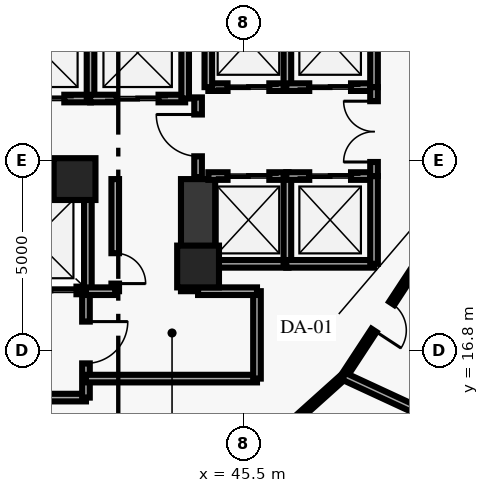
"""IFC4 building model, lengths in metres.
Left out: names, types, materials, properties, quantities, classifications, styles, units other than length and angle.
Written with IfcOpenShell. Run it as: python <this file> out.ifc"""

import sys

from ifc_helpers import new_model, si_unit, direction, frame, frame_2d, origin, origin_2d, place, context, subcontext, project, spatial, rectangle, extrude, element, fill, save


model = new_model("IFC4")
c1 = context("Model", 3, precision=1e-05, world=origin(), true_north=direction((0.0, 1.0)))
c2 = subcontext(c1, "Body", "Model", "MODEL_VIEW")
j1 = project(units=[si_unit("LENGTHUNIT", "METRE"), si_unit("PLANEANGLEUNIT", "RADIAN")], contexts=[c1])
p1 = place(None, origin())
s1 = spatial("IfcSite", under=j1, at=p1, CompositionType="ELEMENT")
p2 = place(p1, origin())
s2 = spatial("IfcBuilding", under=s1, at=p2, CompositionType="ELEMENT")
p3 = place(p2, origin())
s3 = spatial("IfcBuildingStorey", under=s2, at=p3, CompositionType="ELEMENT", Elevation=0.0)
for number, where, z_axis, x_axis in (
    (1, (41.05, 21.3, 0.0), (0.0, 0.0, 1.0), (1.0, 0.0, 0.0)),
    (2, (44.3, 19.0, 0.0), (0.0, 0.0, 1.0), (1.0, 0.0, 0.0)),
):
    element("IfcColumn", number, at=place(p3, frame(where, z_axis=z_axis, x_axis=x_axis)), inside=s3, PredefinedType="PILASTER", context=c2, shape_type="SweptSolid", body=[
        extrude(rectangle(XDim=1.1, YDim=1.1, at=origin_2d()), origin(), (0.0, 0.0, 1.0), 5.7),
    ])
p4 = place(p3, frame((44.3, 18.35, 0.0), z_axis=(0.0, 0.0, 1.0), x_axis=(0.0, 1.0, 0.0)))
e3 = element("IfcWall", 3, at=p4, inside=s3, PredefinedType="SHEAR", context=c2, shape_type="SweptSolid", body=[
    extrude(rectangle(XDim=2.95, YDim=0.9, at=frame_2d((1.475, 0.0))), origin(), (0.0, 0.0, 1.0), 5.7),
])
p5 = place(p3, frame((33.7, 21.3, 0.0), z_axis=(0.0, 0.0, 1.0), x_axis=(1.0, 0.0, 0.0)))
e4 = element("IfcWall", 4, at=p5, inside=s3, PredefinedType="SHEAR", context=c2, shape_type="SweptSolid", body=[
    extrude(rectangle(XDim=7.55, YDim=0.9, at=frame_2d((3.775, 0.0))), origin(), (0.0, 0.0, 1.0), 5.7),
])
p6 = place(p3, frame((44.57, 23.72, 0.0), z_axis=(0.0, 0.0, 1.0), x_axis=(1.0, 0.0, 0.0)))
e5 = element("IfcWall", 5, at=p6, inside=s3, PredefinedType="SOLIDWALL", context=c2, shape_type="SweptSolid", body=[
    extrude(rectangle(XDim=2.11, YDim=0.2, at=frame_2d((1.055, 0.0))), origin(), (0.0, 0.0, 1.0), 5.7),
])
p7 = place(p6, frame((0.505, 0.0, 0.0)))
e6 = element("IfcOpeningElement", 6, at=p7, cuts=e5, PredefinedType="OPENING", context=c2, shape_type="SweptSolid", body=[
    extrude(rectangle(XDim=1.1, YDim=2.15, at=frame_2d((0.55, 1.075))), frame((0.0, 0.11, 0.0), z_axis=(0.0, -1.0, 0.0), x_axis=(1.0, 0.0, 0.0)), (0.0, 0.0, 1.0), 0.22),
])
for number, where, z_axis, x_axis in (
    (7, (44.57, 23.72, 0.0), (0.0, 0.0, 1.0), (0.0, 1.0, 0.0)),
    (8, (46.65, 23.72, 0.0), (0.0, 0.0, 1.0), (0.0, 1.0, 0.0)),
):
    element("IfcWall", number, at=place(p3, frame(where, z_axis=z_axis, x_axis=x_axis)), inside=s3, PredefinedType="SOLIDWALL", context=c2, shape_type="SweptSolid", body=[
        extrude(rectangle(XDim=2.41, YDim=0.2, at=frame_2d((1.205, 0.0))), origin(), (0.0, 0.0, 1.0), 5.7),
    ])
p8 = place(p3, frame((46.62, 23.72, 0.0), z_axis=(0.0, 0.0, 1.0), x_axis=(1.0, 0.0, 0.0)))
e9 = element("IfcWall", 9, at=p8, inside=s3, PredefinedType="SOLIDWALL", context=c2, shape_type="SweptSolid", body=[
    extrude(rectangle(XDim=2.31, YDim=0.2, at=frame_2d((1.155, 0.0))), origin(), (0.0, 0.0, 1.0), 5.7),
])
p9 = place(p8, frame((0.605, 0.0, 0.0)))
e10 = element("IfcOpeningElement", 10, at=p9, cuts=e9, PredefinedType="OPENING", context=c2, shape_type="SweptSolid", body=[
    extrude(rectangle(XDim=1.1, YDim=2.15, at=frame_2d((0.55, 1.075))), frame((0.0, 0.11, 0.0), z_axis=(0.0, -1.0, 0.0), x_axis=(1.0, 0.0, 0.0)), (0.0, 0.0, 1.0), 0.22),
])
p10 = place(p3, frame((48.93, 23.72, 0.0), z_axis=(0.0, 0.0, 1.0), x_axis=(0.0, 1.0, 0.0)))
e11 = element("IfcWall", 11, at=p10, inside=s3, PredefinedType="SOLIDWALL", context=c2, shape_type="SweptSolid", body=[
    extrude(rectangle(XDim=2.41, YDim=0.2, at=frame_2d((1.205, 0.0))), origin(), (0.0, 0.0, 1.0), 5.7),
])
p11 = place(p3, frame((44.57, 19.07, 0.0), z_axis=(0.0, 0.0, 1.0), x_axis=(1.0, 0.0, 0.0)))
e12 = element("IfcWall", 12, at=p11, inside=s3, PredefinedType="SOLIDWALL", context=c2, shape_type="SweptSolid", body=[
    extrude(rectangle(XDim=2.11, YDim=0.2, at=frame_2d((1.055, 0.0))), origin(), (0.0, 0.0, 1.0), 5.7),
])
p12 = place(p3, frame((44.57, 21.38, 0.0), z_axis=(0.0, 0.0, 1.0), x_axis=(1.0, 0.0, 0.0)))
e13 = element("IfcWall", 13, at=p12, inside=s3, PredefinedType="SOLIDWALL", context=c2, shape_type="SweptSolid", body=[
    extrude(rectangle(XDim=2.11, YDim=0.2, at=frame_2d((1.055, 0.0))), origin(), (0.0, 0.0, 1.0), 5.7),
])
p13 = place(p12, frame((0.505, 0.0, 0.0)))
e14 = element("IfcOpeningElement", 14, at=p13, cuts=e13, PredefinedType="OPENING", context=c2, shape_type="SweptSolid", body=[
    extrude(rectangle(XDim=1.1, YDim=2.15, at=frame_2d((0.55, 1.075))), frame((0.0, 0.11, 0.0), z_axis=(0.0, -1.0, 0.0), x_axis=(1.0, 0.0, 0.0)), (0.0, 0.0, 1.0), 0.22),
])
for number, where, z_axis, x_axis in (
    (15, (46.65, 19.07, 0.0), (0.0, 0.0, 1.0), (0.0, 1.0, 0.0)),
    (16, (46.62, 19.07, 0.0), (0.0, 0.0, 1.0), (1.0, 0.0, 0.0)),
):
    element("IfcWall", number, at=place(p3, frame(where, z_axis=z_axis, x_axis=x_axis)), inside=s3, PredefinedType="SOLIDWALL", context=c2, shape_type="SweptSolid", body=[
        extrude(rectangle(XDim=2.31, YDim=0.2, at=frame_2d((1.155, 0.0))), origin(), (0.0, 0.0, 1.0), 5.7),
    ])
p14 = place(p3, frame((46.62, 21.38, 0.0), z_axis=(0.0, 0.0, 1.0), x_axis=(1.0, 0.0, 0.0)))
e17 = element("IfcWall", 17, at=p14, inside=s3, PredefinedType="SOLIDWALL", context=c2, shape_type="SweptSolid", body=[
    extrude(rectangle(XDim=2.31, YDim=0.2, at=frame_2d((1.155, 0.0))), origin(), (0.0, 0.0, 1.0), 5.7),
])
p15 = place(p14, frame((0.605, 0.0, 0.0)))
e18 = element("IfcOpeningElement", 18, at=p15, cuts=e17, PredefinedType="OPENING", context=c2, shape_type="SweptSolid", body=[
    extrude(rectangle(XDim=1.1, YDim=2.15, at=frame_2d((0.55, 1.075))), frame((0.0, 0.11, 0.0), z_axis=(0.0, -1.0, 0.0), x_axis=(1.0, 0.0, 0.0)), (0.0, 0.0, 1.0), 0.22),
])
p16 = place(p3, frame((48.93, 19.07, 0.0), z_axis=(0.0, 0.0, 1.0), x_axis=(0.0, 1.0, 0.0)))
e19 = element("IfcWall", 19, at=p16, inside=s3, PredefinedType="SOLIDWALL", context=c2, shape_type="SweptSolid", body=[
    extrude(rectangle(XDim=2.31, YDim=0.2, at=frame_2d((1.155, 0.0))), origin(), (0.0, 0.0, 1.0), 5.7),
])
p17 = place(p3, frame((38.98, 23.42, 0.0), z_axis=(0.0, 0.0, 1.0), x_axis=(1.0, 0.0, 0.0)))
e20 = element("IfcWall", 20, at=p17, inside=s3, PredefinedType="SOLIDWALL", context=c2, shape_type="SweptSolid", body=[
    extrude(rectangle(XDim=2.5, YDim=0.2, at=frame_2d((1.25, 0.0))), origin(), (0.0, 0.0, 1.0), 5.7),
])
p18 = place(p17, frame((0.7, 0.0, 0.0)))
e21 = element("IfcOpeningElement", 21, at=p18, cuts=e20, PredefinedType="OPENING", context=c2, shape_type="SweptSolid", body=[
    extrude(rectangle(XDim=1.1, YDim=2.15, at=frame_2d((0.55, 1.075))), frame((0.0, 0.11, 0.0), z_axis=(0.0, -1.0, 0.0), x_axis=(1.0, 0.0, 0.0)), (0.0, 0.0, 1.0), 0.22),
])
p19 = place(p3, frame((41.47, 23.42, 0.0), z_axis=(0.0, 0.0, 1.0), x_axis=(0.0, 1.0, 0.0)))
e22 = element("IfcWall", 22, at=p19, inside=s3, PredefinedType="SOLIDWALL", context=c2, shape_type="SweptSolid", body=[
    extrude(rectangle(XDim=2.41, YDim=0.2, at=frame_2d((1.205, 0.0))), origin(), (0.0, 0.0, 1.0), 5.7),
])
p20 = place(p3, frame((41.46, 23.42, 0.0), z_axis=(0.0, 0.0, 1.0), x_axis=(1.0, 0.0, 0.0)))
e23 = element("IfcWall", 23, at=p20, inside=s3, PredefinedType="SOLIDWALL", context=c2, shape_type="SweptSolid", body=[
    extrude(rectangle(XDim=2.5, YDim=0.2, at=frame_2d((1.25, 0.0))), origin(), (0.0, 0.0, 1.0), 5.7),
])
p21 = place(p20, frame((0.7, 0.0, 0.0)))
e24 = element("IfcOpeningElement", 24, at=p21, cuts=e23, PredefinedType="OPENING", context=c2, shape_type="SweptSolid", body=[
    extrude(rectangle(XDim=1.1, YDim=2.15, at=frame_2d((0.55, 1.075))), frame((0.0, 0.11, 0.0), z_axis=(0.0, -1.0, 0.0), x_axis=(1.0, 0.0, 0.0)), (0.0, 0.0, 1.0), 0.22),
])
p22 = place(p3, frame((43.96, 23.42, 0.0), z_axis=(0.0, 0.0, 1.0), x_axis=(0.0, 1.0, 0.0)))
e25 = element("IfcWall", 25, at=p22, inside=s3, PredefinedType="SOLIDWALL", context=c2, shape_type="SweptSolid", body=[
    extrude(rectangle(XDim=2.41, YDim=0.2, at=frame_2d((1.205, 0.0))), origin(), (0.0, 0.0, 1.0), 5.7),
])
p23 = place(p3, frame((38.57, 18.37, 0.0), z_axis=(0.0, 0.0, 1.0), x_axis=(1.0, 0.0, 0.0)))
e26 = element("IfcWall", 26, at=p23, inside=s3, PredefinedType="SOLIDWALL", context=c2, shape_type="SweptSolid", body=[
    extrude(rectangle(XDim=2.83, YDim=0.2, at=frame_2d((1.415, 0.0))), origin(), (0.0, 0.0, 1.0), 5.7),
])
p24 = place(p23, frame((1.18, 0.0, 0.0)))
e27 = element("IfcOpeningElement", 27, at=p24, cuts=e26, PredefinedType="OPENING", context=c2, shape_type="SweptSolid", body=[
    extrude(rectangle(XDim=1.35, YDim=2.18, at=frame_2d((0.675, 1.09))), frame((0.0, 0.11, 0.0), z_axis=(0.0, -1.0, 0.0), x_axis=(1.0, 0.0, 0.0)), (0.0, 0.0, 1.0), 0.22),
])
p25 = place(p3, frame((41.4, 18.37, 0.0), z_axis=(0.0, 0.0, 1.0), x_axis=(0.0, 1.0, 0.0)))
e28 = element("IfcWall", 28, at=p25, inside=s3, PredefinedType="SOLIDWALL", context=c2, shape_type="SweptSolid", body=[
    extrude(rectangle(XDim=2.71, YDim=0.2, at=frame_2d((1.355, 0.0))), origin(), (0.0, 0.0, 1.0), 5.7),
])
p26 = place(p3, frame((48.93, 23.72, 0.0), z_axis=(0.0, 0.0, 1.0), x_axis=(0.0, -1.0, 0.0)))
e29 = element("IfcWall", 29, at=p26, inside=s3, PredefinedType="SOLIDWALL", context=c2, shape_type="SweptSolid", body=[
    extrude(rectangle(XDim=2.34, YDim=0.2, at=frame_2d((1.17, 0.0))), origin(), (0.0, 0.0, 1.0), 5.7),
])
p27 = place(p26, frame((0.37, 0.0, 0.0)))
e30 = element("IfcOpeningElement", 30, at=p27, cuts=e29, PredefinedType="OPENING", context=c2, shape_type="SweptSolid", body=[
    extrude(rectangle(XDim=1.6, YDim=2.2, at=frame_2d((0.8, 1.1))), frame((0.0, 0.11, 0.0), z_axis=(0.0, -1.0, 0.0), x_axis=(1.0, 0.0, 0.0)), (0.0, 0.0, 1.0), 0.22),
])
p28 = place(p3, frame((44.3, 23.45, 0.0), z_axis=(0.0, 0.0, 1.0), x_axis=(0.0, -1.0, 0.0)))
e31 = element("IfcWall", 31, at=p28, inside=s3, PredefinedType="SOLIDWALL", context=c2, shape_type="SweptSolid", body=[
    extrude(rectangle(XDim=2.1, YDim=0.2, at=frame_2d((1.05, 0.0))), origin(), (0.0, 0.0, 1.0), 4.92),
])
p29 = place(p28, frame((0.45, 0.0, 0.0)))
e32 = element("IfcOpeningElement", 32, at=p29, cuts=e31, PredefinedType="OPENING", context=c2, shape_type="SweptSolid", body=[
    extrude(rectangle(XDim=1.1, YDim=2.15, at=frame_2d((0.55, 1.075))), frame((0.0, 0.11, 0.0), z_axis=(0.0, -1.0, 0.0), x_axis=(1.0, 0.0, 0.0)), (0.0, 0.0, 1.0), 0.22),
])
p30 = place(p3, frame((33.8, 15.55, 0.0), z_axis=(0.0, 0.0, 1.0), x_axis=(1.0, 0.0, 0.0)))
e33 = element("IfcWall", 33, at=p30, inside=s3, PredefinedType="SOLIDWALL", context=c2, shape_type="SweptSolid", body=[
    extrude(rectangle(XDim=7.55, YDim=0.2, at=frame_2d((3.775, 0.0))), origin(), (0.0, 0.0, 1.0), 5.7),
])
p31 = place(p3, frame((41.35, 18.35, 0.0), z_axis=(0.0, 0.0, 1.0), x_axis=(0.0, -1.0, 0.0)))
e34 = element("IfcWall", 34, at=p31, inside=s3, PredefinedType="SOLIDWALL", context=c2, shape_type="SweptSolid", body=[
    extrude(rectangle(XDim=2.8, YDim=0.2, at=frame_2d((1.4, 0.0))), origin(), (0.0, 0.0, 1.0), 5.7),
])
p32 = place(p31, frame((0.8, 0.0, 0.0)))
e35 = element("IfcOpeningElement", 35, at=p32, cuts=e34, PredefinedType="OPENING", context=c2, shape_type="SweptSolid", body=[
    extrude(rectangle(XDim=1.1, YDim=2.15, at=frame_2d((0.55, 1.075))), frame((0.0, 0.11, 0.0), z_axis=(0.0, -1.0, 0.0), x_axis=(1.0, 0.0, 0.0)), (0.0, 0.0, 1.0), 0.22),
])
p33 = place(p3, frame((41.35, 16.05, 0.0), z_axis=(0.0, 0.0, 1.0), x_axis=(1.0, 0.0, 0.0)))
e36 = element("IfcWall", 36, at=p33, inside=s3, PredefinedType="SOLIDWALL", context=c2, shape_type="SweptSolid", body=[
    extrude(rectangle(XDim=4.5, YDim=0.2, at=frame_2d((2.25, 0.0))), origin(), (0.0, 0.0, 1.0), 5.7),
])
p34 = place(p3, frame((45.85, 16.05, 0.0), z_axis=(0.0, 0.0, 1.0), x_axis=(0.0, 1.0, 0.0)))
e37 = element("IfcWall", 37, at=p34, inside=s3, PredefinedType="SOLIDWALL", context=c2, shape_type="SweptSolid", body=[
    extrude(rectangle(XDim=2.3, YDim=0.2, at=frame_2d((1.15, 0.0))), origin(), (0.0, 0.0, 1.0), 5.7),
])
p35 = place(p3, frame((44.3, 18.35, 0.0), z_axis=(0.0, 0.0, 1.0), x_axis=(1.0, 0.0, 0.0)))
e38 = element("IfcWall", 38, at=p35, inside=s3, PredefinedType="SOLIDWALL", context=c2, shape_type="SweptSolid", body=[
    extrude(rectangle(XDim=1.55, YDim=0.2, at=frame_2d((0.775, 0.0))), origin(), (0.0, 0.0, 1.0), 5.7),
])
p36 = place(p3, frame((42.12, 18.35, 0.0), z_axis=(0.0, 0.0, 1.0), x_axis=(0.0, 1.0, 0.0)))
e39 = element("IfcWall", 39, at=p36, inside=s3, PredefinedType="SOLIDWALL", context=c2, shape_type="SweptSolid", body=[
    extrude(rectangle(XDim=2.95, YDim=0.2, at=frame_2d((1.475, 0.0))), origin(), (0.0, 0.0, 1.0), 5.7),
])
p37 = place(p36, frame((0.2, 0.0, 0.0)))
e40 = element("IfcOpeningElement", 40, at=p37, cuts=e39, PredefinedType="OPENING", context=c2, shape_type="SweptSolid", body=[
    extrude(rectangle(XDim=0.8, YDim=2.05, at=frame_2d((0.4, 1.025))), frame((0.0, 0.11, 0.0), z_axis=(0.0, -1.0, 0.0), x_axis=(1.0, 0.0, 0.0)), (0.0, 0.0, 1.0), 0.22),
])
p38 = place(p3, frame((41.35, 18.35, 0.0), z_axis=(0.0, 0.0, 1.0), x_axis=(1.0, 0.0, 0.0)))
e41 = element("IfcWall", 41, at=p38, inside=s3, PredefinedType="SOLIDWALL", context=c2, shape_type="SweptSolid", body=[
    extrude(rectangle(XDim=0.77, YDim=0.2, at=frame_2d((0.385, 0.0))), origin(), (0.0, 0.0, 1.0), 5.7),
])
p39 = place(p3, frame((45.46, 13.706, 0.0), z_axis=(0.0, 0.0, 1.0), x_axis=(0.744066617248, 0.668105432621, 0.0)))
e42 = element("IfcWall", 42, at=p39, inside=s3, PredefinedType="PARTITIONING", context=c2, shape_type="SweptSolid", body=[
    extrude(rectangle(XDim=3.596, YDim=0.16, at=frame_2d((1.798, 0.0))), origin(), (0.0, 0.0, 1.0), 5.7),
])
p40 = place(p3, frame((50.189, 19.24, 0.0), z_axis=(0.0, 0.0, 1.0), x_axis=(-0.548318837904, -0.836269365694, 0.0)))
e43 = element("IfcWall", 43, at=p40, inside=s3, PredefinedType="PARTITIONING", context=c2, shape_type="SweptSolid", body=[
    extrude(rectangle(XDim=3.744, YDim=0.16, at=frame_2d((1.872, 0.0))), origin(), (0.0, 0.0, 1.0), 5.7),
])
p41 = place(p40, frame((1.447, 0.0, 0.0)))
e44 = element("IfcOpeningElement", 44, at=p41, cuts=e43, PredefinedType="OPENING", context=c2, shape_type="SweptSolid", body=[
    extrude(rectangle(XDim=0.85, YDim=2.1, at=frame_2d((0.425, 1.05))), frame((0.0, 0.09, 0.0), z_axis=(0.0, -1.0, 0.0), x_axis=(1.0, 0.0, 0.0)), (0.0, 0.0, 1.0), 0.18),
])
p42 = place(p3, frame((48.136, 16.109, 0.0), z_axis=(0.0, 0.0, 1.0), x_axis=(0.907508335547, -0.420034071133, 0.0)))
e45 = element("IfcWall", 45, at=p42, inside=s3, PredefinedType="PARTITIONING", context=c2, shape_type="SweptSolid", body=[
    extrude(rectangle(XDim=2.538, YDim=0.2, at=frame_2d((1.269, 0.0))), origin(), (0.0, 0.0, 1.0), 5.7),
])
p43 = place(p7, origin())
e46 = element("IfcDoor", 46, at=p43, inside=s3, OperationType="DOUBLE_DOOR_SLIDING", PredefinedType="DOOR", context=c2, shape_type="SweptSolid", body=[
    extrude(rectangle(XDim=1.1, YDim=2.15, at=frame_2d((0.55, 1.075))), frame((0.0, 0.025, 0.0), z_axis=(0.0, -1.0, 0.0), x_axis=(1.0, 0.0, 0.0)), (0.0, 0.0, 1.0), 0.05),
])
fill(e6, e46)
p44 = place(p9, origin())
e47 = element("IfcDoor", 47, at=p44, inside=s3, OperationType="DOUBLE_DOOR_SLIDING", PredefinedType="DOOR", context=c2, shape_type="SweptSolid", body=[
    extrude(rectangle(XDim=1.1, YDim=2.15, at=frame_2d((0.55, 1.075))), frame((0.0, 0.025, 0.0), z_axis=(0.0, -1.0, 0.0), x_axis=(1.0, 0.0, 0.0)), (0.0, 0.0, 1.0), 0.05),
])
fill(e10, e47)
p45 = place(p13, origin())
e48 = element("IfcDoor", 48, at=p45, inside=s3, OperationType="DOUBLE_DOOR_SLIDING", PredefinedType="DOOR", context=c2, shape_type="SweptSolid", body=[
    extrude(rectangle(XDim=1.1, YDim=2.15, at=frame_2d((0.55, 1.075))), frame((0.0, 0.025, 0.0), z_axis=(0.0, -1.0, 0.0), x_axis=(1.0, 0.0, 0.0)), (0.0, 0.0, 1.0), 0.05),
])
fill(e14, e48)
p46 = place(p15, origin())
e49 = element("IfcDoor", 49, at=p46, inside=s3, OperationType="DOUBLE_DOOR_SLIDING", PredefinedType="DOOR", context=c2, shape_type="SweptSolid", body=[
    extrude(rectangle(XDim=1.1, YDim=2.15, at=frame_2d((0.55, 1.075))), frame((0.0, 0.025, 0.0), z_axis=(0.0, -1.0, 0.0), x_axis=(1.0, 0.0, 0.0)), (0.0, 0.0, 1.0), 0.05),
])
fill(e18, e49)
p47 = place(p18, origin())
e50 = element("IfcDoor", 50, at=p47, inside=s3, OperationType="DOUBLE_DOOR_SLIDING", PredefinedType="DOOR", context=c2, shape_type="SweptSolid", body=[
    extrude(rectangle(XDim=1.1, YDim=2.15, at=frame_2d((0.55, 1.075))), frame((0.0, 0.025, 0.0), z_axis=(0.0, -1.0, 0.0), x_axis=(1.0, 0.0, 0.0)), (0.0, 0.0, 1.0), 0.05),
])
fill(e21, e50)
p48 = place(p21, origin())
e51 = element("IfcDoor", 51, at=p48, inside=s3, OperationType="DOUBLE_DOOR_SLIDING", PredefinedType="DOOR", context=c2, shape_type="SweptSolid", body=[
    extrude(rectangle(XDim=1.1, YDim=2.15, at=frame_2d((0.55, 1.075))), frame((0.0, 0.025, 0.0), z_axis=(0.0, -1.0, 0.0), x_axis=(1.0, 0.0, 0.0)), (0.0, 0.0, 1.0), 0.05),
])
fill(e24, e51)
p49 = place(p24, origin())
e52 = element("IfcDoor", 52, at=p49, inside=s3, OperationType="DOUBLE_DOOR_SLIDING", PredefinedType="DOOR", context=c2, shape_type="SweptSolid", body=[
    extrude(rectangle(XDim=1.35, YDim=2.18, at=frame_2d((0.675, 1.09))), frame((0.0, 0.025, 0.0), z_axis=(0.0, -1.0, 0.0), x_axis=(1.0, 0.0, 0.0)), (0.0, 0.0, 1.0), 0.05),
])
fill(e27, e52)
p50 = place(p27, origin())
e53 = element("IfcDoor", 53, at=p50, inside=s3, OperationType="DOUBLE_DOOR_SINGLE_SWING", PredefinedType="DOOR", context=c2, shape_type="SweptSolid", body=[
    extrude(rectangle(XDim=1.6, YDim=2.2, at=frame_2d((0.8, 1.1))), frame((0.0, 0.025, 0.0), z_axis=(0.0, -1.0, 0.0), x_axis=(1.0, 0.0, 0.0)), (0.0, 0.0, 1.0), 0.05),
])
fill(e30, e53)
p51 = place(p29, origin())
e54 = element("IfcDoor", 54, at=p51, inside=s3, OperationType="SINGLE_SWING_LEFT", PredefinedType="DOOR", context=c2, shape_type="SweptSolid", body=[
    extrude(rectangle(XDim=1.1, YDim=2.15, at=frame_2d((0.55, 1.075))), frame((0.0, 0.025, 0.0), z_axis=(0.0, -1.0, 0.0), x_axis=(1.0, 0.0, 0.0)), (0.0, 0.0, 1.0), 0.05),
])
fill(e32, e54)
p52 = place(p32, origin())
e55 = element("IfcDoor", 55, at=p52, inside=s3, OperationType="SINGLE_SWING_LEFT", PredefinedType="DOOR", context=c2, shape_type="SweptSolid", body=[
    extrude(rectangle(XDim=1.1, YDim=2.15, at=frame_2d((0.55, 1.075))), frame((0.0, 0.025, 0.0), z_axis=(0.0, -1.0, 0.0), x_axis=(1.0, 0.0, 0.0)), (0.0, 0.0, 1.0), 0.05),
])
fill(e35, e55)
p53 = place(p37, origin())
e56 = element("IfcDoor", 56, at=p53, inside=s3, OperationType="SINGLE_SWING_LEFT", PredefinedType="DOOR", context=c2, shape_type="SweptSolid", body=[
    extrude(rectangle(XDim=0.8, YDim=2.05, at=frame_2d((0.4, 1.025))), frame((0.0, 0.025, 0.0), z_axis=(0.0, -1.0, 0.0), x_axis=(1.0, 0.0, 0.0)), (0.0, 0.0, 1.0), 0.05),
])
fill(e40, e56)
p54 = place(p41, origin())
e57 = element("IfcDoor", 57, at=p54, inside=s3, OperationType="SINGLE_SWING_RIGHT", PredefinedType="DOOR", context=c2, shape_type="SweptSolid", body=[
    extrude(rectangle(XDim=0.85, YDim=2.1, at=frame_2d((0.425, 1.05))), frame((0.0, 0.025, 0.0), z_axis=(0.0, -1.0, 0.0), x_axis=(1.0, 0.0, 0.0)), (0.0, 0.0, 1.0), 0.05),
])
fill(e44, e57)
save(model, sys.argv[1])
